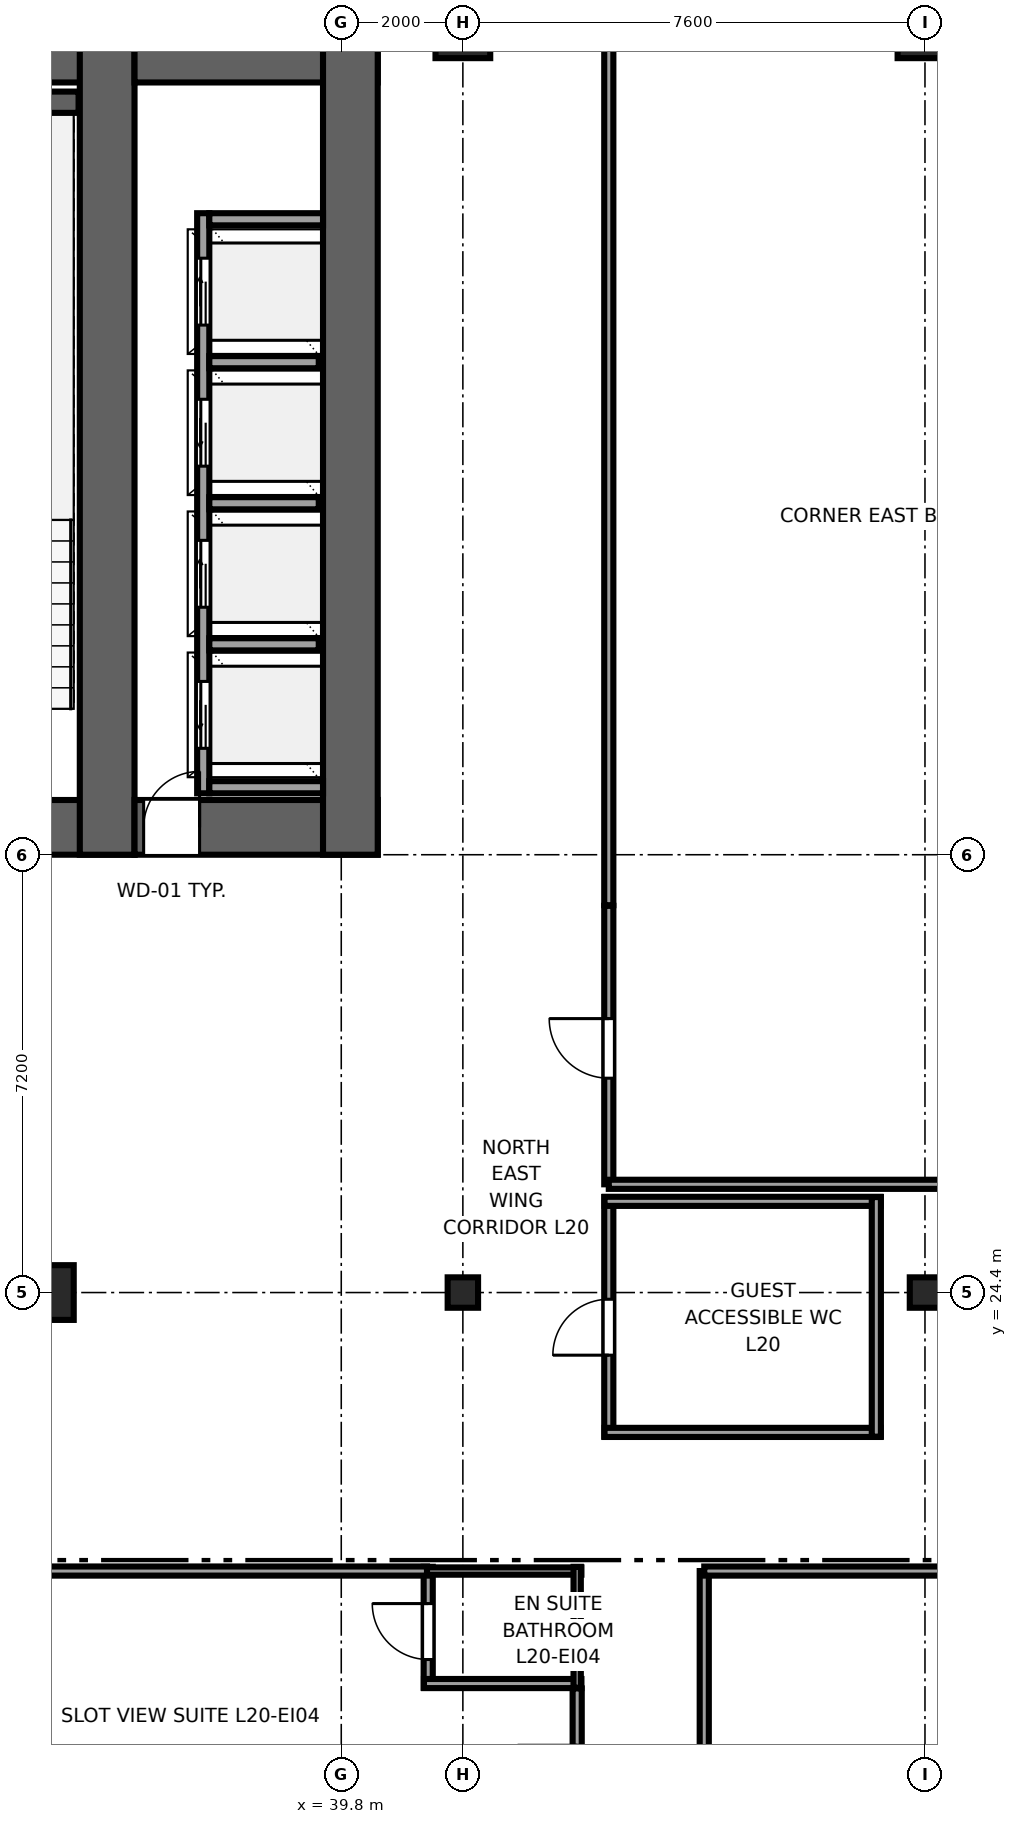
"""IFC4 building model, lengths in metres.
Left out: names, types, materials, properties, quantities, classifications, styles, units other than length and angle.
Written with IfcOpenShell. Run it as: python <this file> out.ifc"""

import sys

from ifc_helpers import new_model, si_unit, direction, frame, frame_2d, origin, origin_2d, place, context, subcontext, project, spatial, rectangle, i_section, extrude, source, transform, mapped, element, fill, save


model = new_model("IFC4")
c1 = context("Model", 3, precision=1e-05, world=origin(), true_north=direction((0.0, 1.0)))
c2 = subcontext(c1, "Body", "Model", "MODEL_VIEW")
j1 = project(units=[si_unit("LENGTHUNIT", "METRE"), si_unit("PLANEANGLEUNIT", "RADIAN")], contexts=[c1])
p1 = place(None, origin())
s1 = spatial("IfcSite", under=j1, at=p1, CompositionType="ELEMENT")
p2 = place(p1, origin())
s2 = spatial("IfcBuilding", under=s1, at=p2, CompositionType="ELEMENT")
p3 = place(p2, frame((0.0, 0.0, 81.7)))
s3 = spatial("IfcBuildingStorey", under=s2, at=p3, CompositionType="ELEMENT", Elevation=81.7)
p4 = place(p3, frame((9.6, 32.05, 0.0), z_axis=(0.0, 0.0, 1.0), x_axis=(1.0, 0.0, 0.0)))
e1 = element("IfcWall", 1, at=p4, inside=s3, PredefinedType="SHEAR", context=c2, shape_type="SweptSolid", body=[
    extrude(rectangle(XDim=26.8, YDim=0.9, at=frame_2d((13.4, 0.0))), origin(), (0.0, 0.0, 1.0), 3.55),
])
p5 = place(p4, frame((6.52, 0.0, 0.0), z_axis=(0.0, 0.0, 1.0), x_axis=(-1.0, 0.0, 0.0)))
e2 = element("IfcOpeningElement", 2, at=p5, cuts=e1, PredefinedType="OPENING", context=c2, shape_type="SweptSolid", body=[
    extrude(rectangle(XDim=1.5, YDim=2.04, at=frame_2d((0.75, 1.02))), frame((0.0, 0.46, 0.0), z_axis=(0.0, -1.0, 0.0), x_axis=(1.0, 0.0, 0.0)), (0.0, 0.0, 1.0), 0.92),
])
p6 = place(p4, frame((14.15, 0.0, 0.0), z_axis=(0.0, 0.0, 1.0), x_axis=(-1.0, 0.0, 0.0)))
e3 = element("IfcOpeningElement", 3, at=p6, cuts=e1, PredefinedType="OPENING", context=c2, shape_type="SweptSolid", body=[
    extrude(rectangle(XDim=1.5, YDim=2.04, at=frame_2d((0.75, 1.02))), frame((0.0, 0.46, 0.0), z_axis=(0.0, -1.0, 0.0), x_axis=(1.0, 0.0, 0.0)), (0.0, 0.0, 1.0), 0.92),
])
p7 = place(p4, frame((21.78, 0.0, 0.0), z_axis=(0.0, 0.0, 1.0), x_axis=(-1.0, 0.0, 0.0)))
e4 = element("IfcOpeningElement", 4, at=p7, cuts=e1, PredefinedType="OPENING", context=c2, shape_type="SweptSolid", body=[
    extrude(rectangle(XDim=1.5, YDim=2.04, at=frame_2d((0.75, 1.02))), frame((0.0, 0.46, 0.0), z_axis=(0.0, -1.0, 0.0), x_axis=(1.0, 0.0, 0.0)), (0.0, 0.0, 1.0), 0.92),
])
p8 = place(p4, frame((8.57, 0.0, 0.0), z_axis=(0.0, 0.0, 1.0), x_axis=(-1.0, 0.0, 0.0)))
e5 = element("IfcOpeningElement", 5, at=p8, cuts=e1, PredefinedType="OPENING", context=c2, shape_type="SweptSolid", body=[
    extrude(rectangle(XDim=0.82, YDim=2.01, at=frame_2d((0.41, 1.005))), frame((0.0, 0.46, 0.0), z_axis=(0.0, -1.0, 0.0), x_axis=(1.0, 0.0, 0.0)), (0.0, 0.0, 1.0), 0.92),
])
p9 = place(p4, frame((19.07, 0.0, 0.0), z_axis=(0.0, 0.0, 1.0), x_axis=(-1.0, 0.0, 0.0)))
e6 = element("IfcOpeningElement", 6, at=p9, cuts=e1, PredefinedType="OPENING", context=c2, shape_type="SweptSolid", body=[
    extrude(rectangle(XDim=0.82, YDim=2.01, at=frame_2d((0.41, 1.005))), frame((0.0, 0.46, 0.0), z_axis=(0.0, -1.0, 0.0), x_axis=(1.0, 0.0, 0.0)), (0.0, 0.0, 1.0), 0.92),
])
p10 = place(p3, frame((9.6, 44.75, 0.0), z_axis=(0.0, 0.0, 1.0), x_axis=(1.0, 0.0, 0.0)))
e7 = element("IfcWall", 7, at=p10, inside=s3, PredefinedType="SHEAR", context=c2, shape_type="SweptSolid", body=[
    extrude(rectangle(XDim=26.8, YDim=0.9, at=frame_2d((13.4, 0.0))), origin(), (0.0, 0.0, 1.0), 3.55),
])
p11 = place(p3, frame((35.95, 31.6, 0.0), z_axis=(0.0, 0.0, 1.0), x_axis=(0.0, 1.0, 0.0)))
e8 = element("IfcWall", 8, at=p11, inside=s3, PredefinedType="SHEAR", context=c2, shape_type="SweptSolid", body=[
    extrude(rectangle(XDim=13.6, YDim=0.9, at=frame_2d((6.8, 0.0))), origin(), (0.0, 0.0, 1.0), 3.55),
])
p12 = place(p3, frame((36.4, 32.05, 0.0), z_axis=(0.0, 0.0, 1.0), x_axis=(1.0, 0.0, 0.0)))
e9 = element("IfcWall", 9, at=p12, inside=s3, PredefinedType="SHEAR", context=c2, shape_type="SweptSolid", body=[
    extrude(rectangle(XDim=4.0, YDim=0.9, at=frame_2d((2.0, 0.0))), origin(), (0.0, 0.0, 1.0), 3.55),
])
p13 = place(p12, frame((1.07, 0.0, 0.0), z_axis=(0.0, 0.0, 1.0), x_axis=(-1.0, 0.0, 0.0)))
e10 = element("IfcOpeningElement", 10, at=p13, cuts=e9, PredefinedType="OPENING", context=c2, shape_type="SweptSolid", body=[
    extrude(rectangle(XDim=0.92, YDim=2.01, at=frame_2d((0.46, 1.005))), frame((0.0, 0.46, 0.0), z_axis=(0.0, -1.0, 0.0), x_axis=(1.0, 0.0, 0.0)), (0.0, 0.0, 1.0), 0.92),
])
p14 = place(p3, frame((36.4, 44.75, 0.0), z_axis=(0.0, 0.0, 1.0), x_axis=(1.0, 0.0, 0.0)))
e11 = element("IfcWall", 11, at=p14, inside=s3, PredefinedType="SHEAR", context=c2, shape_type="SweptSolid", body=[
    extrude(rectangle(XDim=4.0, YDim=0.9, at=frame_2d((2.0, 0.0))), origin(), (0.0, 0.0, 1.0), 3.55),
])
p15 = place(p3, frame((39.95, 31.6, 0.0), z_axis=(0.0, 0.0, 1.0), x_axis=(0.0, 1.0, 0.0)))
e12 = element("IfcWall", 12, at=p15, inside=s3, PredefinedType="SHEAR", context=c2, shape_type="SweptSolid", body=[
    extrude(rectangle(XDim=13.6, YDim=0.9, at=frame_2d((6.8, 0.0))), origin(), (0.0, 0.0, 1.0), 3.55),
])
p16 = place(p3, frame((31.88, 43.975, 0.0), z_axis=(0.0, 0.0, 1.0), x_axis=(1.0, 0.0, 0.0)))
e13 = element("IfcWall", 13, at=p16, inside=s3, PredefinedType="SHEAR", context=c2, shape_type="SweptSolid", body=[
    extrude(rectangle(XDim=3.6, YDim=0.35, at=frame_2d((1.8, 0.0))), origin(), (0.0, 0.0, 1.0), 3.55),
])
m1 = source(origin(), c2, "Body", "SweptSolid", [
    extrude(rectangle(XDim=0.9, YDim=0.9, at=origin_2d()), origin(), (0.0, 0.0, 1.0), 3.55),
])
p17 = place(p3, frame((34.95, 24.4, 0.0), z_axis=(0.0, 0.0, 1.0), x_axis=(1.0, 0.0, 0.0)))
e14 = element("IfcColumn", 14, at=p17, inside=s3, PredefinedType="COLUMN", context=c2, shape_type="MappedRepresentation", body=[
    mapped(m1, transform((0.0, 0.0, 0.0), x_axis=(1.0, 0.0, 0.0), y_axis=(0.0, 1.0, 0.0), z_axis=(0.0, 0.0, 1.0), scale=1.0)),
])
m2 = source(origin(), c2, "Body", "SweptSolid", [
    extrude(i_section(OverallWidth=0.5, OverallDepth=0.5, WebThickness=0.022, FlangeThickness=0.034, at=origin_2d()), origin(), (0.0, 0.0, 1.0), 3.55),
])
for number, where, z_axis, x_axis in (
    (15, (41.8, 24.4, 0.0), (0.0, 0.0, 1.0), (1.0, 0.0, 0.0)),
    (16, (49.4, 24.4, 0.0), (0.0, 0.0, 1.0), (1.0, 0.0, 0.0)),
):
    element("IfcColumn", number, at=place(p3, frame(where, z_axis=z_axis, x_axis=x_axis)), inside=s3, PredefinedType="COLUMN", context=c2, shape_type="MappedRepresentation", body=[
        mapped(m2, transform((0.0, 0.0, 0.0), x_axis=(1.0, 0.0, 0.0), y_axis=(0.0, 1.0, 0.0), z_axis=(0.0, 0.0, 1.0), scale=1.0)),
    ])
for number, where, z_axis, x_axis in (
    (17, (41.8, 45.15, 0.0), (0.0, 0.0, 1.0), (1.0, 0.0, 0.0)),
    (18, (49.4, 45.15, 0.0), (0.0, 0.0, 1.0), (1.0, 0.0, 0.0)),
):
    element("IfcColumn", number, at=place(p3, frame(where, z_axis=z_axis, x_axis=x_axis)), inside=s3, PredefinedType="COLUMN", context=c2, shape_type="MappedRepresentation", body=[
        mapped(m1, transform((0.0, 0.0, 0.0), x_axis=(1.0, 0.0, 0.0), y_axis=(0.0, 1.0, 0.0), z_axis=(0.0, 0.0, 1.0), scale=1.0)),
    ])
p18 = place(p3, frame((37.53, 32.61, 0.0), z_axis=(0.0, 0.0, 1.0), x_axis=(0.0, 1.0, 0.0)))
e19 = element("IfcWall", 19, at=p18, inside=s3, PredefinedType="SOLIDWALL", context=c2, shape_type="SweptSolid", body=[
    extrude(rectangle(XDim=9.54, YDim=0.2, at=frame_2d((4.77, 0.0))), origin(), (0.0, 0.0, 1.0), 3.37),
])
p19 = place(p18, frame((0.74, 0.0, 0.0)))
e20 = element("IfcOpeningElement", 20, at=p19, cuts=e19, PredefinedType="OPENING", context=c2, shape_type="SweptSolid", body=[
    extrude(rectangle(XDim=1.1, YDim=2.12, at=frame_2d((0.55, 1.06))), frame((0.0, 0.11, 0.0), z_axis=(0.0, -1.0, 0.0), x_axis=(1.0, 0.0, 0.0)), (0.0, 0.0, 1.0), 0.22),
])
p20 = place(p18, frame((3.06, 0.0, 0.0)))
e21 = element("IfcOpeningElement", 21, at=p20, cuts=e19, PredefinedType="OPENING", context=c2, shape_type="SweptSolid", body=[
    extrude(rectangle(XDim=1.1, YDim=2.12, at=frame_2d((0.55, 1.06))), frame((0.0, 0.11, 0.0), z_axis=(0.0, -1.0, 0.0), x_axis=(1.0, 0.0, 0.0)), (0.0, 0.0, 1.0), 0.22),
])
p21 = place(p18, frame((5.38, 0.0, 0.0)))
e22 = element("IfcOpeningElement", 22, at=p21, cuts=e19, PredefinedType="OPENING", context=c2, shape_type="SweptSolid", body=[
    extrude(rectangle(XDim=1.1, YDim=2.12, at=frame_2d((0.55, 1.06))), frame((0.0, 0.11, 0.0), z_axis=(0.0, -1.0, 0.0), x_axis=(1.0, 0.0, 0.0)), (0.0, 0.0, 1.0), 0.22),
])
p22 = place(p18, frame((7.7, 0.0, 0.0)))
e23 = element("IfcOpeningElement", 23, at=p22, cuts=e19, PredefinedType="OPENING", context=c2, shape_type="SweptSolid", body=[
    extrude(rectangle(XDim=1.1, YDim=2.12, at=frame_2d((0.55, 1.06))), frame((0.0, 0.11, 0.0), z_axis=(0.0, -1.0, 0.0), x_axis=(1.0, 0.0, 0.0)), (0.0, 0.0, 1.0), 0.22),
])
for number, where, z_axis, x_axis in (
    (24, (37.63, 32.71, 0.0), (0.0, 0.0, 1.0), (1.0, 0.0, 0.0)),
    (25, (37.63, 42.05, 0.0), (0.0, 0.0, 1.0), (1.0, 0.0, 0.0)),
):
    element("IfcWall", number, at=place(p3, frame(where, z_axis=z_axis, x_axis=x_axis)), inside=s3, PredefinedType="SOLIDWALL", context=c2, shape_type="SweptSolid", body=[
        extrude(rectangle(XDim=1.87, YDim=0.2, at=frame_2d((0.935, 0.0))), origin(), (0.0, 0.0, 1.0), 3.37),
    ])
for number, where, z_axis, x_axis in (
    (26, (37.63, 35.06, 0.0), (0.0, 0.0, 1.0), (1.0, 0.0, 0.0)),
    (27, (37.63, 37.38, 0.0), (0.0, 0.0, 1.0), (1.0, 0.0, 0.0)),
    (28, (37.63, 39.7, 0.0), (0.0, 0.0, 1.0), (1.0, 0.0, 0.0)),
):
    element("IfcWall", number, at=place(p3, frame(where, z_axis=z_axis, x_axis=x_axis)), inside=s3, PredefinedType="SOLIDWALL", context=c2, shape_type="SweptSolid", body=[
        extrude(rectangle(XDim=1.8, YDim=0.2, at=frame_2d((0.9, 0.0))), origin(), (0.0, 0.0, 1.0), 3.37),
    ])
p23 = place(p3, frame((41.23, 17.9, 0.0), z_axis=(0.0, 0.0, 1.0), x_axis=(0.0, 1.0, 0.0)))
e29 = element("IfcWall", 29, at=p23, inside=s3, PredefinedType="PARTITIONING", context=c2, shape_type="SweptSolid", body=[
    extrude(rectangle(XDim=1.99, YDim=0.15, at=frame_2d((0.995, 0.0))), origin(), (0.0, 0.0, 1.0), 3.37),
])
p24 = place(p23, frame((0.465, 0.0, 0.0)))
e30 = element("IfcOpeningElement", 30, at=p24, cuts=e29, PredefinedType="OPENING", context=c2, shape_type="SweptSolid", body=[
    extrude(rectangle(XDim=0.92, YDim=2.01, at=frame_2d((0.46, 1.005))), frame((0.0, 0.085, 0.0), z_axis=(0.0, -1.0, 0.0), x_axis=(1.0, 0.0, 0.0)), (0.0, 0.0, 1.0), 0.17),
])
p25 = place(p3, frame((41.16, 17.97, 0.0), z_axis=(0.0, 0.0, 1.0), x_axis=(1.0, 0.0, 0.0)))
e31 = element("IfcWall", 31, at=p25, inside=s3, PredefinedType="PARTITIONING", context=c2, shape_type="SweptSolid", body=[
    extrude(rectangle(XDim=2.59, YDim=0.15, at=frame_2d((1.295, 0.0))), origin(), (0.0, 0.0, 1.0), 3.37),
])
p26 = place(p3, frame((41.16, 19.82, 0.0), z_axis=(0.0, 0.0, 1.0), x_axis=(1.0, 0.0, 0.0)))
e32 = element("IfcWall", 32, at=p26, inside=s3, PredefinedType="PLUMBINGWALL", context=c2, shape_type="SweptSolid", body=[
    extrude(rectangle(XDim=2.59, YDim=0.12, at=frame_2d((1.295, 0.0))), origin(), (0.0, 0.0, 1.0), 3.37),
])
p27 = place(p3, frame((43.68, 17.9, 0.0), z_axis=(0.0, 0.0, 1.0), x_axis=(0.0, 1.0, 0.0)))
e33 = element("IfcWall", 33, at=p27, inside=s3, PredefinedType="PLUMBINGWALL", context=c2, shape_type="SweptSolid", body=[
    extrude(rectangle(XDim=1.99, YDim=0.12, at=frame_2d((0.995, 0.0))), origin(), (0.0, 0.0, 1.0), 3.37),
])
p28 = place(p3, frame((43.68, 15.08, 0.0), z_axis=(0.0, 0.0, 1.0), x_axis=(0.0, 1.0, 0.0)))
e34 = element("IfcWall", 34, at=p28, inside=s3, PredefinedType="PARTITIONING", context=c2, shape_type="SweptSolid", body=[
    extrude(rectangle(XDim=2.81, YDim=0.15, at=frame_2d((1.405, 0.0))), origin(), (0.0, 0.0, 1.0), 3.37),
])
p29 = place(p28, frame((0.895, 0.0, 0.0)))
e35 = element("IfcOpeningElement", 35, at=p29, cuts=e34, PredefinedType="OPENING", context=c2, shape_type="SweptSolid", body=[
    extrude(rectangle(XDim=0.98, YDim=2.12, at=frame_2d((0.49, 1.06))), frame((0.0, 0.085, 0.0), z_axis=(0.0, -1.0, 0.0), x_axis=(1.0, 0.0, 0.0)), (0.0, 0.0, 1.0), 0.17),
])
p30 = place(p3, frame((34.65, 19.82, 0.0), z_axis=(0.0, 0.0, 1.0), x_axis=(1.0, 0.0, 0.0)))
e36 = element("IfcWall", 36, at=p30, inside=s3, PredefinedType="PARTITIONING", context=c2, shape_type="SweptSolid", body=[
    extrude(rectangle(XDim=6.56, YDim=0.15, at=frame_2d((3.28, 0.0))), origin(), (0.0, 0.0, 1.0), 3.37),
])
p31 = place(p3, frame((45.77, 12.41, 0.0), z_axis=(0.0, 0.0, 1.0), x_axis=(0.0, 1.0, 0.0)))
e37 = element("IfcWall", 37, at=p31, inside=s3, PredefinedType="PARTITIONING", context=c2, shape_type="SweptSolid", body=[
    extrude(rectangle(XDim=7.41, YDim=0.15, at=frame_2d((3.705, 0.0))), origin(), (0.0, 0.0, 1.0), 3.37),
])
p32 = place(p31, frame((3.195, 0.0, 0.0)))
e38 = element("IfcOpeningElement", 38, at=p32, cuts=e37, PredefinedType="OPENING", context=c2, shape_type="SweptSolid", body=[
    extrude(rectangle(XDim=0.98, YDim=2.12, at=frame_2d((0.49, 1.06))), frame((0.0, 0.085, 0.0), z_axis=(0.0, -1.0, 0.0), x_axis=(1.0, 0.0, 0.0)), (0.0, 0.0, 1.0), 0.17),
])
p33 = place(p3, frame((45.77, 19.82, 0.0), z_axis=(0.0, 0.0, 1.0), x_axis=(1.0, 0.0, 0.0)))
e39 = element("IfcWall", 39, at=p33, inside=s3, PredefinedType="PARTITIONING", context=c2, shape_type="SweptSolid", body=[
    extrude(rectangle(XDim=10.825, YDim=0.15, at=frame_2d((5.413, 0.0))), origin(), (0.0, 0.0, 1.0), 3.37),
])
p34 = place(p3, frame((44.2, 22.03, 0.0), z_axis=(0.0, 0.0, 1.0), x_axis=(0.0, 1.0, 0.0)))
e40 = element("IfcWall", 40, at=p34, inside=s3, PredefinedType="PARTITIONING", context=c2, shape_type="SweptSolid", body=[
    extrude(rectangle(XDim=3.94, YDim=0.15, at=frame_2d((1.97, 0.0))), origin(), (0.0, 0.0, 1.0), 3.37),
])
p35 = place(p34, frame((1.34, 0.0, 0.0)))
e41 = element("IfcOpeningElement", 41, at=p35, cuts=e40, PredefinedType="OPENING", context=c2, shape_type="SweptSolid", body=[
    extrude(rectangle(XDim=0.92, YDim=2.01, at=frame_2d((0.46, 1.005))), frame((0.0, 0.085, 0.0), z_axis=(0.0, -1.0, 0.0), x_axis=(1.0, 0.0, 0.0)), (0.0, 0.0, 1.0), 0.17),
])
for number, where, z_axis, x_axis in (
    (42, (44.13, 22.1, 0.0), (0.0, 0.0, 1.0), (1.0, 0.0, 0.0)),
    (43, (44.13, 25.9, 0.0), (0.0, 0.0, 1.0), (1.0, 0.0, 0.0)),
):
    element("IfcWall", number, at=place(p3, frame(where, z_axis=z_axis, x_axis=x_axis)), inside=s3, PredefinedType="PARTITIONING", context=c2, shape_type="SweptSolid", body=[
        extrude(rectangle(XDim=4.54, YDim=0.15, at=frame_2d((2.27, 0.0))), origin(), (0.0, 0.0, 1.0), 3.37),
    ])
p36 = place(p3, frame((48.6, 22.03, 0.0), z_axis=(0.0, 0.0, 1.0), x_axis=(0.0, 1.0, 0.0)))
e44 = element("IfcWall", 44, at=p36, inside=s3, PredefinedType="PARTITIONING", context=c2, shape_type="SweptSolid", body=[
    extrude(rectangle(XDim=3.94, YDim=0.15, at=frame_2d((1.97, 0.0))), origin(), (0.0, 0.0, 1.0), 3.37),
])
p37 = place(p3, frame((44.2, 26.18, 0.0), z_axis=(0.0, 0.0, 1.0), x_axis=(0.0, 1.0, 0.0)))
e45 = element("IfcWall", 45, at=p37, inside=s3, PredefinedType="PARTITIONING", context=c2, shape_type="SweptSolid", body=[
    extrude(rectangle(XDim=4.58, YDim=0.15, at=frame_2d((2.29, 0.0))), origin(), (0.0, 0.0, 1.0), 3.37),
])
p38 = place(p37, frame((1.745, 0.0, 0.0)))
e46 = element("IfcOpeningElement", 46, at=p38, cuts=e45, PredefinedType="OPENING", context=c2, shape_type="SweptSolid", body=[
    extrude(rectangle(XDim=0.98, YDim=2.12, at=frame_2d((0.49, 1.06))), frame((0.0, 0.085, 0.0), z_axis=(0.0, -1.0, 0.0), x_axis=(1.0, 0.0, 0.0)), (0.0, 0.0, 1.0), 0.17),
])
p39 = place(p3, frame((44.2, 26.18, 0.0), z_axis=(0.0, 0.0, 1.0), x_axis=(1.0, 0.0, 0.0)))
e47 = element("IfcWall", 47, at=p39, inside=s3, PredefinedType="PARTITIONING", context=c2, shape_type="SweptSolid", body=[
    extrude(rectangle(XDim=10.03, YDim=0.15, at=frame_2d((5.015, 0.0))), origin(), (0.0, 0.0, 1.0), 3.37),
])
p40 = place(p3, frame((44.2, 30.77, 0.0), z_axis=(0.0, 0.0, 1.0), x_axis=(0.0, 1.0, 0.0)))
e48 = element("IfcWall", 48, at=p40, inside=s3, PredefinedType="PARTITIONING", context=c2, shape_type="SweptSolid", body=[
    extrude(rectangle(XDim=14.825, YDim=0.15, at=frame_2d((7.413, 0.0))), origin(), (0.0, 0.0, 1.0), 3.37),
])
m3 = source(origin(), c2, "Body", "SweptSolid", [
    extrude(rectangle(XDim=0.92, YDim=2.01, at=frame_2d((0.46, 1.005))), frame((0.0, 0.025, 0.0), z_axis=(0.0, -1.0, 0.0), x_axis=(1.0, 0.0, 0.0)), (0.0, 0.0, 1.0), 0.05),
])
p41 = place(p13, origin())
e49 = element("IfcDoor", 49, at=p41, inside=s3, OperationType="SINGLE_SWING_RIGHT", PredefinedType="DOOR", context=c2, shape_type="MappedRepresentation", body=[
    mapped(m3, transform((0.0, 0.0, 0.0), x_axis=(1.0, 0.0, 0.0), y_axis=(0.0, 1.0, 0.0), z_axis=(0.0, 0.0, 1.0), scale=1.0)),
])
fill(e10, e49)
m4 = source(origin(), c2, "Body", "SweptSolid", [
    extrude(rectangle(XDim=1.1, YDim=2.12, at=frame_2d((0.55, 1.06))), frame((0.0, 0.025, 0.0), z_axis=(0.0, -1.0, 0.0), x_axis=(1.0, 0.0, 0.0)), (0.0, 0.0, 1.0), 0.05),
])
p42 = place(p19, origin())
e50 = element("IfcDoor", 50, at=p42, inside=s3, OperationType="SLIDING_TO_LEFT", PredefinedType="DOOR", context=c2, shape_type="MappedRepresentation", body=[
    mapped(m4, transform((0.0, 0.0, 0.0), x_axis=(1.0, 0.0, 0.0), y_axis=(0.0, 1.0, 0.0), z_axis=(0.0, 0.0, 1.0), scale=1.0)),
])
fill(e20, e50)
p43 = place(p20, origin())
e51 = element("IfcDoor", 51, at=p43, inside=s3, OperationType="SLIDING_TO_RIGHT", PredefinedType="DOOR", context=c2, shape_type="MappedRepresentation", body=[
    mapped(m4, transform((0.0, 0.0, 0.0), x_axis=(1.0, 0.0, 0.0), y_axis=(0.0, 1.0, 0.0), z_axis=(0.0, 0.0, 1.0), scale=1.0)),
])
fill(e21, e51)
p44 = place(p21, origin())
e52 = element("IfcDoor", 52, at=p44, inside=s3, OperationType="SLIDING_TO_LEFT", PredefinedType="DOOR", context=c2, shape_type="MappedRepresentation", body=[
    mapped(m4, transform((0.0, 0.0, 0.0), x_axis=(1.0, 0.0, 0.0), y_axis=(0.0, 1.0, 0.0), z_axis=(0.0, 0.0, 1.0), scale=1.0)),
])
fill(e22, e52)
p45 = place(p22, origin())
e53 = element("IfcDoor", 53, at=p45, inside=s3, OperationType="SLIDING_TO_RIGHT", PredefinedType="DOOR", context=c2, shape_type="MappedRepresentation", body=[
    mapped(m4, transform((0.0, 0.0, 0.0), x_axis=(1.0, 0.0, 0.0), y_axis=(0.0, 1.0, 0.0), z_axis=(0.0, 0.0, 1.0), scale=1.0)),
])
fill(e23, e53)
p46 = place(p24, origin())
e54 = element("IfcDoor", 54, at=p46, inside=s3, OperationType="SINGLE_SWING_RIGHT", PredefinedType="DOOR", context=c2, shape_type="MappedRepresentation", body=[
    mapped(m3, transform((0.0, 0.0, 0.0), x_axis=(1.0, 0.0, 0.0), y_axis=(0.0, 1.0, 0.0), z_axis=(0.0, 0.0, 1.0), scale=1.0)),
])
fill(e30, e54)
p47 = place(p35, origin())
e55 = element("IfcDoor", 55, at=p47, inside=s3, OperationType="SINGLE_SWING_LEFT", PredefinedType="DOOR", context=c2, shape_type="MappedRepresentation", body=[
    mapped(m3, transform((0.0, 0.0, 0.0), x_axis=(1.0, 0.0, 0.0), y_axis=(0.0, 1.0, 0.0), z_axis=(0.0, 0.0, 1.0), scale=1.0)),
])
fill(e41, e55)
m5 = source(origin(), c2, "Body", "SweptSolid", [
    extrude(rectangle(XDim=0.98, YDim=2.12, at=frame_2d((0.49, 1.06))), frame((0.0, 0.025, 0.0), z_axis=(0.0, -1.0, 0.0), x_axis=(1.0, 0.0, 0.0)), (0.0, 0.0, 1.0), 0.05),
])
p48 = place(p38, origin())
e56 = element("IfcDoor", 56, at=p48, inside=s3, OperationType="SINGLE_SWING_RIGHT", PredefinedType="DOOR", context=c2, shape_type="MappedRepresentation", body=[
    mapped(m5, transform((0.0, 0.0, 0.0), x_axis=(1.0, 0.0, 0.0), y_axis=(0.0, 1.0, 0.0), z_axis=(0.0, 0.0, 1.0), scale=1.0)),
])
fill(e46, e56)
save(model, sys.argv[1])
